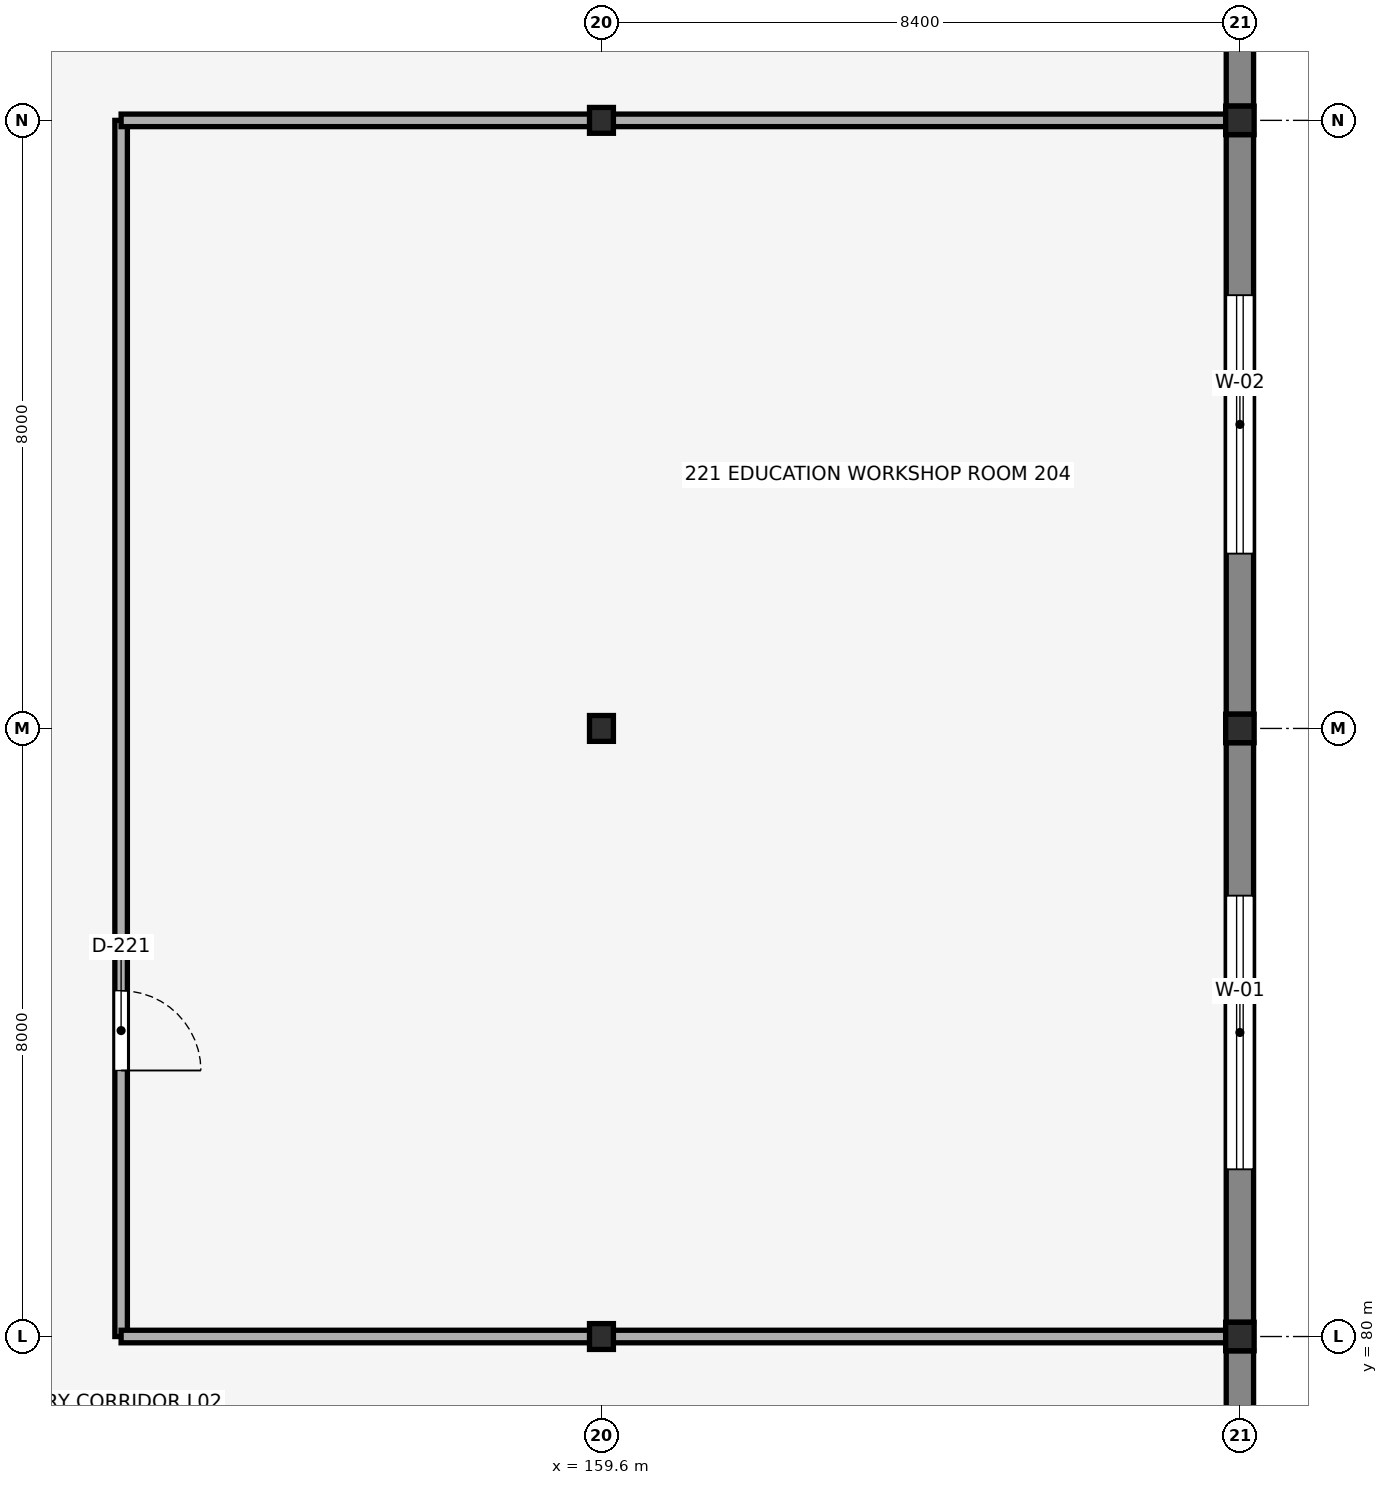
"""IFC4 building model, lengths in metres.
Left out: names, types, materials, properties, quantities, classifications, styles, units other than length and angle.
Written with IfcOpenShell. Run it as: python <this file> out.ifc"""

import sys

from ifc_helpers import new_model, si_unit, direction, frame, frame_2d, origin, origin_2d, place, context, subcontext, project, spatial, rectangle, i_section, extrude, element, fill, save


model = new_model("IFC4")
c1 = context("Model", 3, precision=1e-05, world=origin(), true_north=direction((0.0, 1.0)))
c2 = subcontext(c1, "Body", "Model", "MODEL_VIEW")
j1 = project(units=[si_unit("LENGTHUNIT", "METRE"), si_unit("PLANEANGLEUNIT", "RADIAN")], contexts=[c1])
p1 = place(None, origin())
s1 = spatial("IfcSite", under=j1, at=p1, CompositionType="ELEMENT")
p2 = place(p1, origin())
s2 = spatial("IfcBuilding", under=s1, at=p2, CompositionType="ELEMENT")
p3 = place(p2, frame((0.0, 0.0, 9.52)))
s3 = spatial("IfcBuildingStorey", under=s2, at=p3, CompositionType="ELEMENT", Elevation=9.52)
for number, where, z_axis, x_axis in (
    (1, (159.6, 80.0, 0.0), (0.0, 0.0, 1.0), (1.0, 0.0, 0.0)),
    (2, (159.6, 88.0, 0.0), (0.0, 0.0, 1.0), (1.0, 0.0, 0.0)),
    (3, (159.6, 96.0, 0.0), (0.0, 0.0, 1.0), (1.0, 0.0, 0.0)),
):
    element("IfcColumn", number, at=place(p3, frame(where, z_axis=z_axis, x_axis=x_axis)), inside=s3, PredefinedType="COLUMN", context=c2, shape_type="SweptSolid", body=[
        extrude(i_section(OverallWidth=0.314, OverallDepth=0.34, WebThickness=0.019, FlangeThickness=0.031, FilletRadius=0.015, at=origin_2d()), origin(), (0.0, 0.0, 1.0), 3.57),
    ])
for number, where, z_axis, x_axis in (
    (4, (168.0, 80.0, 0.0), (0.0, 0.0, 1.0), (1.0, 0.0, 0.0)),
    (5, (168.0, 88.0, 0.0), (0.0, 0.0, 1.0), (1.0, 0.0, 0.0)),
    (6, (168.0, 96.0, 0.0), (0.0, 0.0, 1.0), (1.0, 0.0, 0.0)),
):
    element("IfcColumn", number, at=place(p3, frame(where, z_axis=z_axis, x_axis=x_axis)), inside=s3, PredefinedType="COLUMN", context=c2, shape_type="SweptSolid", body=[
        extrude(i_section(OverallWidth=0.375, OverallDepth=0.375, WebThickness=0.017, FlangeThickness=0.027, FilletRadius=0.015, at=origin_2d()), origin(), (0.0, 0.0, 1.0), 3.57),
    ])
p4 = place(p3, frame((168.0, 96.187, 0.0), z_axis=(0.0, 0.0, 1.0), x_axis=(0.0, 1.0, 0.0)))
e7 = element("IfcWall", 7, at=p4, inside=s3, PredefinedType="SOLIDWALL", context=c2, shape_type="SweptSolid", body=[
    extrude(rectangle(XDim=7.625, YDim=0.36, at=frame_2d((3.813, 0.0))), origin(), (0.0, 0.0, 1.0), 3.219),
])
p5 = place(p4, frame((3.338, 0.0, 0.65), z_axis=(0.0, 0.0, 1.0), x_axis=(1.0, 0.0, 0.0)))
e8 = element("IfcOpeningElement", 8, at=p5, cuts=e7, PredefinedType="OPENING", context=c2, shape_type="SweptSolid", body=[
    extrude(rectangle(XDim=0.95, YDim=2.1, at=frame_2d((0.475, 1.05))), frame((0.0, 0.19, 0.0), z_axis=(0.0, -1.0, 0.0), x_axis=(1.0, 0.0, 0.0)), (0.0, 0.0, 1.0), 0.38),
])
p6 = place(p3, frame((168.0, 72.187, 0.0), z_axis=(0.0, 0.0, 1.0), x_axis=(0.0, 1.0, 0.0)))
e9 = element("IfcWall", 9, at=p6, inside=s3, PredefinedType="SOLIDWALL", context=c2, shape_type="SweptSolid", body=[
    extrude(rectangle(XDim=7.625, YDim=0.36, at=frame_2d((3.813, 0.0))), origin(), (0.0, 0.0, 1.0), 3.27),
])
p7 = place(p3, frame((168.0, 80.187, 0.0), z_axis=(0.0, 0.0, 1.0), x_axis=(0.0, 1.0, 0.0)))
e10 = element("IfcWall", 10, at=p7, inside=s3, PredefinedType="SOLIDWALL", context=c2, shape_type="SweptSolid", body=[
    extrude(rectangle(XDim=7.625, YDim=0.36, at=frame_2d((3.813, 0.0))), origin(), (0.0, 0.0, 1.0), 3.219),
])
p8 = place(p7, frame((2.013, 0.0, 0.9), z_axis=(0.0, 0.0, 1.0), x_axis=(1.0, 0.0, 0.0)))
e11 = element("IfcOpeningElement", 11, at=p8, cuts=e10, PredefinedType="OPENING", context=c2, shape_type="SweptSolid", body=[
    extrude(rectangle(XDim=3.6, YDim=1.8, at=frame_2d((1.8, 0.9))), frame((0.0, 0.19, 0.0), z_axis=(0.0, -1.0, 0.0), x_axis=(1.0, 0.0, 0.0)), (0.0, 0.0, 1.0), 0.38),
])
p9 = place(p3, frame((168.0, 88.187, 0.0), z_axis=(0.0, 0.0, 1.0), x_axis=(0.0, 1.0, 0.0)))
e12 = element("IfcWall", 12, at=p9, inside=s3, PredefinedType="SOLIDWALL", context=c2, shape_type="SweptSolid", body=[
    extrude(rectangle(XDim=7.625, YDim=0.36, at=frame_2d((3.813, 0.0))), origin(), (0.0, 0.0, 1.0), 3.219),
])
p10 = place(p9, frame((2.113, 0.0, 0.9), z_axis=(0.0, 0.0, 1.0), x_axis=(1.0, 0.0, 0.0)))
e13 = element("IfcOpeningElement", 13, at=p10, cuts=e12, PredefinedType="OPENING", context=c2, shape_type="SweptSolid", body=[
    extrude(rectangle(XDim=3.4, YDim=1.7, at=frame_2d((1.7, 0.85))), frame((0.0, 0.19, 0.0), z_axis=(0.0, -1.0, 0.0), x_axis=(1.0, 0.0, 0.0)), (0.0, 0.0, 1.0), 0.38),
])
p11 = place(p3, frame((153.28, 80.0, 0.0), z_axis=(0.0, 0.0, 1.0), x_axis=(0.0, 1.0, 0.0)))
e14 = element("IfcWall", 14, at=p11, inside=s3, PredefinedType="PARTITIONING", context=c2, shape_type="SweptSolid", body=[
    extrude(rectangle(XDim=16.0, YDim=0.165, at=frame_2d((8.0, 0.0))), origin(), (0.0, 0.0, 1.0), 3.57),
])
p12 = place(p11, frame((4.55, 0.0, 0.0), z_axis=(0.0, 0.0, 1.0), x_axis=(-1.0, 0.0, 0.0)))
e15 = element("IfcOpeningElement", 15, at=p12, cuts=e14, PredefinedType="OPENING", context=c2, shape_type="SweptSolid", body=[
    extrude(rectangle(XDim=1.05, YDim=2.15, at=frame_2d((0.525, 1.075))), frame((0.0, 0.093, 0.0), z_axis=(0.0, -1.0, 0.0), x_axis=(1.0, 0.0, 0.0)), (0.0, 0.0, 1.0), 0.185),
])
p13 = place(p3, frame((153.28, 80.0, 0.0), z_axis=(0.0, 0.0, 1.0), x_axis=(1.0, 0.0, 0.0)))
e16 = element("IfcWall", 16, at=p13, inside=s3, PredefinedType="PARTITIONING", context=c2, shape_type="SweptSolid", body=[
    extrude(rectangle(XDim=6.173, YDim=0.165, at=frame_2d((3.086, 0.0))), origin(), (0.0, 0.0, 1.0), 3.037),
])
p14 = place(p3, frame((159.747, 80.0, 0.0), z_axis=(0.0, 0.0, 1.0), x_axis=(1.0, 0.0, 0.0)))
e17 = element("IfcWall", 17, at=p14, inside=s3, PredefinedType="PARTITIONING", context=c2, shape_type="SweptSolid", body=[
    extrude(rectangle(XDim=8.075, YDim=0.165, at=frame_2d((4.038, 0.0))), origin(), (0.0, 0.0, 1.0), 3.037),
])
p15 = place(p3, frame((153.28, 96.0, 0.0), z_axis=(0.0, 0.0, 1.0), x_axis=(1.0, 0.0, 0.0)))
e18 = element("IfcWall", 18, at=p15, inside=s3, PredefinedType="PARTITIONING", context=c2, shape_type="SweptSolid", body=[
    extrude(rectangle(XDim=6.173, YDim=0.165, at=frame_2d((3.086, 0.0))), origin(), (0.0, 0.0, 1.0), 3.037),
])
p16 = place(p3, frame((159.747, 96.0, 0.0), z_axis=(0.0, 0.0, 1.0), x_axis=(1.0, 0.0, 0.0)))
e19 = element("IfcWall", 19, at=p16, inside=s3, PredefinedType="PARTITIONING", context=c2, shape_type="SweptSolid", body=[
    extrude(rectangle(XDim=8.075, YDim=0.165, at=frame_2d((4.038, 0.0))), origin(), (0.0, 0.0, 1.0), 3.037),
])
p17 = place(p8, origin())
e20 = element("IfcWindow", 20, at=p17, inside=s3, PartitioningType="TRIPLE_PANEL_VERTICAL", PredefinedType="WINDOW", context=c2, shape_type="SweptSolid", body=[
    extrude(rectangle(XDim=3.6, YDim=1.8, at=frame_2d((1.8, 0.9))), frame((0.0, 0.03, 0.0), z_axis=(0.0, -1.0, 0.0), x_axis=(1.0, 0.0, 0.0)), (0.0, 0.0, 1.0), 0.06),
])
fill(e11, e20)
p18 = place(p10, origin())
e21 = element("IfcWindow", 21, at=p18, inside=s3, PartitioningType="TRIPLE_PANEL_VERTICAL", PredefinedType="WINDOW", context=c2, shape_type="SweptSolid", body=[
    extrude(rectangle(XDim=3.4, YDim=1.7, at=frame_2d((1.7, 0.85))), frame((0.0, 0.03, 0.0), z_axis=(0.0, -1.0, 0.0), x_axis=(1.0, 0.0, 0.0)), (0.0, 0.0, 1.0), 0.06),
])
fill(e13, e21)
p19 = place(p12, origin())
e22 = element("IfcDoor", 22, at=p19, inside=s3, OperationType="SINGLE_SWING_RIGHT", PredefinedType="DOOR", context=c2, shape_type="SweptSolid", body=[
    extrude(rectangle(XDim=1.05, YDim=2.15, at=frame_2d((0.525, 1.075))), frame((0.0, 0.025, 0.0), z_axis=(0.0, -1.0, 0.0), x_axis=(1.0, 0.0, 0.0)), (0.0, 0.0, 1.0), 0.05),
])
fill(e15, e22)
save(model, sys.argv[1])
